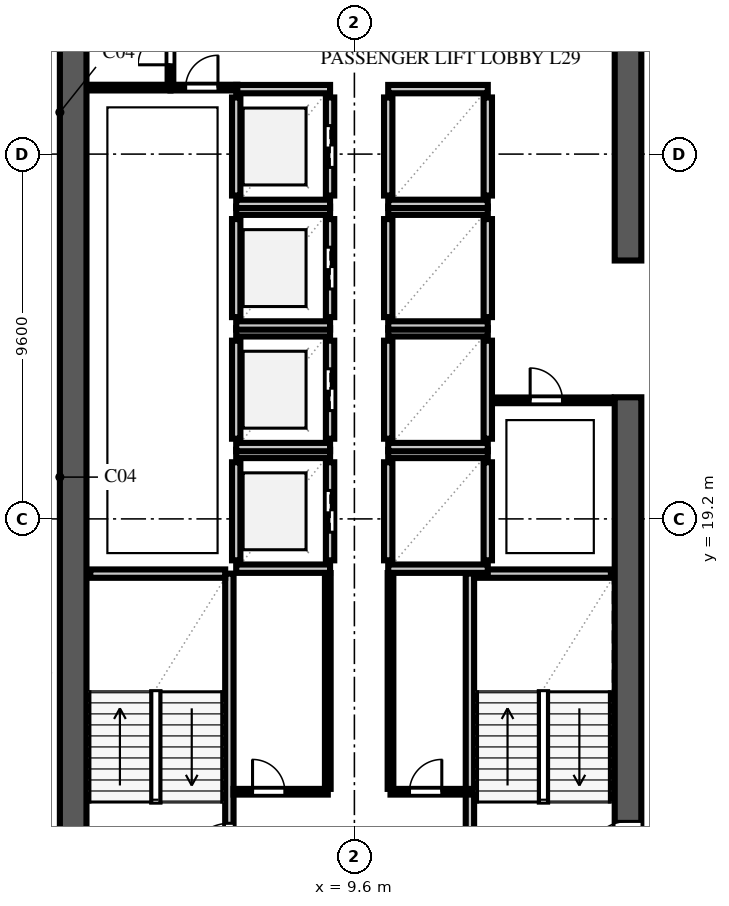
"""IFC4 building model, lengths in metres.
Left out: names, types, materials, properties, quantities, classifications, styles, units other than length and angle.
Written with IfcOpenShell. Run it as: python <this file> out.ifc"""

import sys

from ifc_helpers import new_model, si_unit, direction, frame, frame_2d, origin, place, context, subcontext, project, spatial, rectangle, extrude, element, fill, save


model = new_model("IFC4")
c1 = context("Model", 3, precision=1e-05, world=origin(), true_north=direction((0.0, 1.0)))
c2 = subcontext(c1, "Body", "Model", "MODEL_VIEW")
j1 = project(units=[si_unit("LENGTHUNIT", "METRE"), si_unit("PLANEANGLEUNIT", "RADIAN")], contexts=[c1])
p1 = place(None, origin())
s1 = spatial("IfcSite", under=j1, at=p1, CompositionType="ELEMENT")
p2 = place(p1, origin())
s2 = spatial("IfcBuilding", under=s1, at=p2, CompositionType="ELEMENT")
p3 = place(p2, frame((0.0, 0.0, 116.6)))
s3 = spatial("IfcBuildingStorey", under=s2, at=p3, CompositionType="ELEMENT", Elevation=116.6)
p4 = place(p3, frame((2.2, 9.25, 0.0), z_axis=(0.0, 0.0, 1.0), x_axis=(0.0, 1.0, 0.0)))
e1 = element("IfcWall", 1, at=p4, inside=s3, PredefinedType="SHEAR", context=c2, shape_type="SweptSolid", body=[
    extrude(rectangle(XDim=39.1, YDim=0.7, at=frame_2d((19.55, 0.0))), origin(), (0.0, 0.0, 1.0), 3.54),
])
p5 = place(p3, frame((16.8, 9.95, 0.0), z_axis=(0.0, 0.0, 1.0), x_axis=(0.0, 1.0, 0.0)))
e2 = element("IfcWall", 2, at=p5, inside=s3, PredefinedType="SHEAR", context=c2, shape_type="SweptSolid", body=[
    extrude(rectangle(XDim=12.45, YDim=0.7, at=frame_2d((6.225, 0.0))), origin(), (0.0, 0.0, 1.0), 3.54),
])
p6 = place(p5, frame((0.19, 0.0, 0.0)))
e3 = element("IfcOpeningElement", 3, at=p6, cuts=e2, PredefinedType="OPENING", context=c2, shape_type="SweptSolid", body=[
    extrude(rectangle(XDim=1.1, YDim=2.2, at=frame_2d((0.55, 1.1))), frame((0.0, 0.362, 0.0), z_axis=(0.0, -1.0, 0.0), x_axis=(1.0, 0.0, 0.0)), (0.0, 0.0, 1.0), 0.724),
])
p7 = place(p3, frame((16.8, 26.0, 0.0), z_axis=(0.0, 0.0, 1.0), x_axis=(0.0, 1.0, 0.0)))
e4 = element("IfcWall", 4, at=p7, inside=s3, PredefinedType="SHEAR", context=c2, shape_type="SweptSolid", body=[
    extrude(rectangle(XDim=7.8, YDim=0.7, at=frame_2d((3.9, 0.0))), origin(), (0.0, 0.0, 1.0), 3.54),
])
p8 = place(p3, frame((6.31, 9.95, 0.0), z_axis=(0.0, 0.0, 1.0), x_axis=(0.0, 1.0, 0.0)))
e5 = element("IfcWall", 5, at=p8, inside=s3, PredefinedType="SOLIDWALL", context=c2, shape_type="SweptSolid", body=[
    extrude(rectangle(XDim=7.81, YDim=0.22, at=frame_2d((3.905, 0.0))), origin(), (0.0, 0.0, 1.0), 3.54),
])
p9 = place(p8, frame((0.14, 0.0, 0.0)))
e6 = element("IfcOpeningElement", 6, at=p9, cuts=e5, PredefinedType="OPENING", context=c2, shape_type="SweptSolid", body=[
    extrude(rectangle(XDim=1.1, YDim=2.2, at=frame_2d((0.55, 1.1))), frame((0.0, 0.122, 0.0), z_axis=(0.0, -1.0, 0.0), x_axis=(1.0, 0.0, 0.0)), (0.0, 0.0, 1.0), 0.244),
])
p10 = place(p3, frame((2.65, 17.76, 0.0), z_axis=(0.0, 0.0, 1.0), x_axis=(1.0, 0.0, 0.0)))
e7 = element("IfcWall", 7, at=p10, inside=s3, PredefinedType="SOLIDWALL", context=c2, shape_type="SweptSolid", body=[
    extrude(rectangle(XDim=3.55, YDim=0.22, at=frame_2d((1.775, 0.0))), origin(), (0.0, 0.0, 1.0), 3.54),
])
p11 = place(p3, frame((12.64, 10.05, 0.0), z_axis=(0.0, 0.0, 1.0), x_axis=(0.0, 1.0, 0.0)))
e8 = element("IfcWall", 8, at=p11, inside=s3, PredefinedType="SOLIDWALL", context=c2, shape_type="SweptSolid", body=[
    extrude(rectangle(XDim=7.71, YDim=0.22, at=frame_2d((3.855, 0.0))), origin(), (0.0, 0.0, 1.0), 3.54),
])
p12 = place(p3, frame((12.75, 17.76, 0.0), z_axis=(0.0, 0.0, 1.0), x_axis=(1.0, 0.0, 0.0)))
e9 = element("IfcWall", 9, at=p12, inside=s3, PredefinedType="SOLIDWALL", context=c2, shape_type="SweptSolid", body=[
    extrude(rectangle(XDim=3.6, YDim=0.22, at=frame_2d((1.8, 0.0))), origin(), (0.0, 0.0, 1.0), 3.54),
])
p13 = place(p3, frame((6.49, 18.11, 0.0), z_axis=(0.0, 0.0, 1.0), x_axis=(0.0, 1.0, 0.0)))
e10 = element("IfcWall", 10, at=p13, inside=s3, PredefinedType="SOLIDWALL", context=c2, shape_type="SweptSolid", body=[
    extrude(rectangle(XDim=2.58, YDim=0.22, at=frame_2d((1.29, 0.0))), origin(), (0.0, 0.0, 1.0), 3.54),
])
p14 = place(p3, frame((8.96, 18.11, 0.0), z_axis=(0.0, 0.0, 1.0), x_axis=(0.0, 1.0, 0.0)))
e11 = element("IfcWall", 11, at=p14, inside=s3, PredefinedType="SOLIDWALL", context=c2, shape_type="SweptSolid", body=[
    extrude(rectangle(XDim=2.58, YDim=0.22, at=frame_2d((1.29, 0.0))), origin(), (0.0, 0.0, 1.0), 3.54),
])
p15 = place(p14, frame((0.74, 0.0, 0.0)))
e12 = element("IfcOpeningElement", 12, at=p15, cuts=e11, PredefinedType="OPENING", context=c2, shape_type="SweptSolid", body=[
    extrude(rectangle(XDim=1.1, YDim=2.2, at=frame_2d((0.55, 1.1))), frame((0.0, 0.122, 0.0), z_axis=(0.0, -1.0, 0.0), x_axis=(1.0, 0.0, 0.0)), (0.0, 0.0, 1.0), 0.244),
])
for number, where, z_axis, x_axis in (
    (13, (6.49, 17.89, 0.0), (0.0, 0.0, 1.0), (1.0, 0.0, 0.0)),
    (14, (6.49, 20.91, 0.0), (0.0, 0.0, 1.0), (1.0, 0.0, 0.0)),
):
    element("IfcWall", number, at=place(p3, frame(where, z_axis=z_axis, x_axis=x_axis)), inside=s3, PredefinedType="SOLIDWALL", context=c2, shape_type="SweptSolid", body=[
        extrude(rectangle(XDim=2.47, YDim=0.22, at=frame_2d((1.235, 0.0))), origin(), (0.0, 0.0, 1.0), 3.54),
    ])
p16 = place(p3, frame((6.49, 21.31, 0.0), z_axis=(0.0, 0.0, 1.0), x_axis=(0.0, 1.0, 0.0)))
e15 = element("IfcWall", 15, at=p16, inside=s3, PredefinedType="SOLIDWALL", context=c2, shape_type="SweptSolid", body=[
    extrude(rectangle(XDim=2.58, YDim=0.22, at=frame_2d((1.29, 0.0))), origin(), (0.0, 0.0, 1.0), 3.54),
])
p17 = place(p3, frame((8.96, 21.31, 0.0), z_axis=(0.0, 0.0, 1.0), x_axis=(0.0, 1.0, 0.0)))
e16 = element("IfcWall", 16, at=p17, inside=s3, PredefinedType="SOLIDWALL", context=c2, shape_type="SweptSolid", body=[
    extrude(rectangle(XDim=2.58, YDim=0.22, at=frame_2d((1.29, 0.0))), origin(), (0.0, 0.0, 1.0), 3.54),
])
p18 = place(p17, frame((0.74, 0.0, 0.0)))
e17 = element("IfcOpeningElement", 17, at=p18, cuts=e16, PredefinedType="OPENING", context=c2, shape_type="SweptSolid", body=[
    extrude(rectangle(XDim=1.1, YDim=2.2, at=frame_2d((0.55, 1.1))), frame((0.0, 0.122, 0.0), z_axis=(0.0, -1.0, 0.0), x_axis=(1.0, 0.0, 0.0)), (0.0, 0.0, 1.0), 0.244),
])
for number, where, z_axis, x_axis in (
    (18, (6.49, 21.09, 0.0), (0.0, 0.0, 1.0), (1.0, 0.0, 0.0)),
    (19, (6.49, 24.11, 0.0), (0.0, 0.0, 1.0), (1.0, 0.0, 0.0)),
):
    element("IfcWall", number, at=place(p3, frame(where, z_axis=z_axis, x_axis=x_axis)), inside=s3, PredefinedType="SOLIDWALL", context=c2, shape_type="SweptSolid", body=[
        extrude(rectangle(XDim=2.47, YDim=0.22, at=frame_2d((1.235, 0.0))), origin(), (0.0, 0.0, 1.0), 3.54),
    ])
p19 = place(p3, frame((6.49, 24.51, 0.0), z_axis=(0.0, 0.0, 1.0), x_axis=(0.0, 1.0, 0.0)))
e20 = element("IfcWall", 20, at=p19, inside=s3, PredefinedType="SOLIDWALL", context=c2, shape_type="SweptSolid", body=[
    extrude(rectangle(XDim=2.58, YDim=0.22, at=frame_2d((1.29, 0.0))), origin(), (0.0, 0.0, 1.0), 3.54),
])
p20 = place(p3, frame((8.96, 24.51, 0.0), z_axis=(0.0, 0.0, 1.0), x_axis=(0.0, 1.0, 0.0)))
e21 = element("IfcWall", 21, at=p20, inside=s3, PredefinedType="SOLIDWALL", context=c2, shape_type="SweptSolid", body=[
    extrude(rectangle(XDim=2.58, YDim=0.22, at=frame_2d((1.29, 0.0))), origin(), (0.0, 0.0, 1.0), 3.54),
])
p21 = place(p20, frame((0.74, 0.0, 0.0)))
e22 = element("IfcOpeningElement", 22, at=p21, cuts=e21, PredefinedType="OPENING", context=c2, shape_type="SweptSolid", body=[
    extrude(rectangle(XDim=1.1, YDim=2.2, at=frame_2d((0.55, 1.1))), frame((0.0, 0.122, 0.0), z_axis=(0.0, -1.0, 0.0), x_axis=(1.0, 0.0, 0.0)), (0.0, 0.0, 1.0), 0.244),
])
for number, where, z_axis, x_axis in (
    (23, (6.49, 24.29, 0.0), (0.0, 0.0, 1.0), (1.0, 0.0, 0.0)),
    (24, (6.49, 27.31, 0.0), (0.0, 0.0, 1.0), (1.0, 0.0, 0.0)),
):
    element("IfcWall", number, at=place(p3, frame(where, z_axis=z_axis, x_axis=x_axis)), inside=s3, PredefinedType="SOLIDWALL", context=c2, shape_type="SweptSolid", body=[
        extrude(rectangle(XDim=2.47, YDim=0.22, at=frame_2d((1.235, 0.0))), origin(), (0.0, 0.0, 1.0), 3.54),
    ])
p22 = place(p3, frame((6.49, 27.71, 0.0), z_axis=(0.0, 0.0, 1.0), x_axis=(0.0, 1.0, 0.0)))
e25 = element("IfcWall", 25, at=p22, inside=s3, PredefinedType="SOLIDWALL", context=c2, shape_type="SweptSolid", body=[
    extrude(rectangle(XDim=2.58, YDim=0.22, at=frame_2d((1.29, 0.0))), origin(), (0.0, 0.0, 1.0), 3.54),
])
p23 = place(p3, frame((8.96, 27.71, 0.0), z_axis=(0.0, 0.0, 1.0), x_axis=(0.0, 1.0, 0.0)))
e26 = element("IfcWall", 26, at=p23, inside=s3, PredefinedType="SOLIDWALL", context=c2, shape_type="SweptSolid", body=[
    extrude(rectangle(XDim=2.58, YDim=0.22, at=frame_2d((1.29, 0.0))), origin(), (0.0, 0.0, 1.0), 3.54),
])
p24 = place(p23, frame((0.74, 0.0, 0.0)))
e27 = element("IfcOpeningElement", 27, at=p24, cuts=e26, PredefinedType="OPENING", context=c2, shape_type="SweptSolid", body=[
    extrude(rectangle(XDim=1.1, YDim=2.2, at=frame_2d((0.55, 1.1))), frame((0.0, 0.122, 0.0), z_axis=(0.0, -1.0, 0.0), x_axis=(1.0, 0.0, 0.0)), (0.0, 0.0, 1.0), 0.244),
])
for number, where, z_axis, x_axis in (
    (28, (6.49, 27.49, 0.0), (0.0, 0.0, 1.0), (1.0, 0.0, 0.0)),
    (29, (6.49, 30.51, 0.0), (0.0, 0.0, 1.0), (1.0, 0.0, 0.0)),
):
    element("IfcWall", number, at=place(p3, frame(where, z_axis=z_axis, x_axis=x_axis)), inside=s3, PredefinedType="SOLIDWALL", context=c2, shape_type="SweptSolid", body=[
        extrude(rectangle(XDim=2.47, YDim=0.22, at=frame_2d((1.235, 0.0))), origin(), (0.0, 0.0, 1.0), 3.54),
    ])
for number, where, z_axis, x_axis in (
    (30, (10.49, 18.11, 0.0), (0.0, 0.0, 1.0), (0.0, 1.0, 0.0)),
    (31, (13.11, 18.11, 0.0), (0.0, 0.0, 1.0), (0.0, 1.0, 0.0)),
):
    element("IfcWall", number, at=place(p3, frame(where, z_axis=z_axis, x_axis=x_axis)), inside=s3, PredefinedType="SOLIDWALL", context=c2, shape_type="SweptSolid", body=[
        extrude(rectangle(XDim=2.58, YDim=0.22, at=frame_2d((1.29, 0.0))), origin(), (0.0, 0.0, 1.0), 3.54),
    ])
for number, where, z_axis, x_axis in (
    (32, (10.49, 17.89, 0.0), (0.0, 0.0, 1.0), (1.0, 0.0, 0.0)),
    (33, (10.49, 20.91, 0.0), (0.0, 0.0, 1.0), (1.0, 0.0, 0.0)),
):
    element("IfcWall", number, at=place(p3, frame(where, z_axis=z_axis, x_axis=x_axis)), inside=s3, PredefinedType="SOLIDWALL", context=c2, shape_type="SweptSolid", body=[
        extrude(rectangle(XDim=2.62, YDim=0.22, at=frame_2d((1.31, 0.0))), origin(), (0.0, 0.0, 1.0), 3.54),
    ])
for number, where, z_axis, x_axis in (
    (34, (10.49, 21.31, 0.0), (0.0, 0.0, 1.0), (0.0, 1.0, 0.0)),
    (35, (13.11, 21.31, 0.0), (0.0, 0.0, 1.0), (0.0, 1.0, 0.0)),
):
    element("IfcWall", number, at=place(p3, frame(where, z_axis=z_axis, x_axis=x_axis)), inside=s3, PredefinedType="SOLIDWALL", context=c2, shape_type="SweptSolid", body=[
        extrude(rectangle(XDim=2.58, YDim=0.22, at=frame_2d((1.29, 0.0))), origin(), (0.0, 0.0, 1.0), 3.54),
    ])
for number, where, z_axis, x_axis in (
    (36, (10.49, 21.09, 0.0), (0.0, 0.0, 1.0), (1.0, 0.0, 0.0)),
    (37, (10.49, 24.11, 0.0), (0.0, 0.0, 1.0), (1.0, 0.0, 0.0)),
):
    element("IfcWall", number, at=place(p3, frame(where, z_axis=z_axis, x_axis=x_axis)), inside=s3, PredefinedType="SOLIDWALL", context=c2, shape_type="SweptSolid", body=[
        extrude(rectangle(XDim=2.62, YDim=0.22, at=frame_2d((1.31, 0.0))), origin(), (0.0, 0.0, 1.0), 3.54),
    ])
for number, where, z_axis, x_axis in (
    (38, (10.49, 24.51, 0.0), (0.0, 0.0, 1.0), (0.0, 1.0, 0.0)),
    (39, (13.11, 24.51, 0.0), (0.0, 0.0, 1.0), (0.0, 1.0, 0.0)),
):
    element("IfcWall", number, at=place(p3, frame(where, z_axis=z_axis, x_axis=x_axis)), inside=s3, PredefinedType="SOLIDWALL", context=c2, shape_type="SweptSolid", body=[
        extrude(rectangle(XDim=2.58, YDim=0.22, at=frame_2d((1.29, 0.0))), origin(), (0.0, 0.0, 1.0), 3.54),
    ])
for number, where, z_axis, x_axis in (
    (40, (10.49, 24.29, 0.0), (0.0, 0.0, 1.0), (1.0, 0.0, 0.0)),
    (41, (10.49, 27.31, 0.0), (0.0, 0.0, 1.0), (1.0, 0.0, 0.0)),
):
    element("IfcWall", number, at=place(p3, frame(where, z_axis=z_axis, x_axis=x_axis)), inside=s3, PredefinedType="SOLIDWALL", context=c2, shape_type="SweptSolid", body=[
        extrude(rectangle(XDim=2.62, YDim=0.22, at=frame_2d((1.31, 0.0))), origin(), (0.0, 0.0, 1.0), 3.54),
    ])
for number, where, z_axis, x_axis in (
    (42, (10.49, 27.71, 0.0), (0.0, 0.0, 1.0), (0.0, 1.0, 0.0)),
    (43, (13.11, 27.71, 0.0), (0.0, 0.0, 1.0), (0.0, 1.0, 0.0)),
):
    element("IfcWall", number, at=place(p3, frame(where, z_axis=z_axis, x_axis=x_axis)), inside=s3, PredefinedType="SOLIDWALL", context=c2, shape_type="SweptSolid", body=[
        extrude(rectangle(XDim=2.58, YDim=0.22, at=frame_2d((1.29, 0.0))), origin(), (0.0, 0.0, 1.0), 3.54),
    ])
for number, where, z_axis, x_axis in (
    (44, (10.49, 27.49, 0.0), (0.0, 0.0, 1.0), (1.0, 0.0, 0.0)),
    (45, (10.49, 30.51, 0.0), (0.0, 0.0, 1.0), (1.0, 0.0, 0.0)),
):
    element("IfcWall", number, at=place(p3, frame(where, z_axis=z_axis, x_axis=x_axis)), inside=s3, PredefinedType="SOLIDWALL", context=c2, shape_type="SweptSolid", body=[
        extrude(rectangle(XDim=2.62, YDim=0.22, at=frame_2d((1.31, 0.0))), origin(), (0.0, 0.0, 1.0), 3.54),
    ])
p25 = place(p3, frame((6.42, 12.02, 0.0), z_axis=(0.0, 0.0, 1.0), x_axis=(1.0, 0.0, 0.0)))
e46 = element("IfcWall", 46, at=p25, inside=s3, PredefinedType="PARTITIONING", context=c2, shape_type="SweptSolid", body=[
    extrude(rectangle(XDim=2.48, YDim=0.15, at=frame_2d((1.24, 0.0))), origin(), (0.0, 0.0, 1.0), 3.54),
])
p26 = place(p25, frame((0.5, 0.0, 0.0)))
e47 = element("IfcOpeningElement", 47, at=p26, cuts=e46, PredefinedType="OPENING", context=c2, shape_type="SweptSolid", body=[
    extrude(rectangle(XDim=0.85, YDim=2.1, at=frame_2d((0.425, 1.05))), frame((0.0, 0.087, 0.0), z_axis=(0.0, -1.0, 0.0), x_axis=(1.0, 0.0, 0.0)), (0.0, 0.0, 1.0), 0.174),
])
p27 = place(p3, frame((10.55, 12.02, 0.0), z_axis=(0.0, 0.0, 1.0), x_axis=(1.0, 0.0, 0.0)))
e48 = element("IfcWall", 48, at=p27, inside=s3, PredefinedType="PARTITIONING", context=c2, shape_type="SweptSolid", body=[
    extrude(rectangle(XDim=2.08, YDim=0.15, at=frame_2d((1.04, 0.0))), origin(), (0.0, 0.0, 1.0), 3.54),
])
p28 = place(p27, frame((0.5, 0.0, 0.0)))
e49 = element("IfcOpeningElement", 49, at=p28, cuts=e48, PredefinedType="OPENING", context=c2, shape_type="SweptSolid", body=[
    extrude(rectangle(XDim=0.85, YDim=2.1, at=frame_2d((0.425, 1.05))), frame((0.0, 0.087, 0.0), z_axis=(0.0, -1.0, 0.0), x_axis=(1.0, 0.0, 0.0)), (0.0, 0.0, 1.0), 0.174),
])
for number, where, z_axis, x_axis in (
    (50, (8.9, 12.095, 0.0), (0.0, 0.0, 1.0), (0.0, 1.0, 0.0)),
    (51, (10.55, 12.095, 0.0), (0.0, 0.0, 1.0), (0.0, 1.0, 0.0)),
):
    element("IfcWall", number, at=place(p3, frame(where, z_axis=z_axis, x_axis=x_axis)), inside=s3, PredefinedType="PARTITIONING", context=c2, shape_type="SweptSolid", body=[
        extrude(rectangle(XDim=5.68, YDim=0.15, at=frame_2d((2.84, 0.0))), origin(), (0.0, 0.0, 1.0), 3.54),
    ])
p29 = place(p3, frame((13.225, 22.32, 0.0), z_axis=(0.0, 0.0, 1.0), x_axis=(1.0, 0.0, 0.0)))
e52 = element("IfcWall", 52, at=p29, inside=s3, PredefinedType="PARTITIONING", context=c2, shape_type="SweptSolid", body=[
    extrude(rectangle(XDim=3.12, YDim=0.15, at=frame_2d((1.56, 0.0))), origin(), (0.0, 0.0, 1.0), 3.54),
])
p30 = place(p29, frame((1.0, 0.0, 0.0)))
e53 = element("IfcOpeningElement", 53, at=p30, cuts=e52, PredefinedType="OPENING", context=c2, shape_type="SweptSolid", body=[
    extrude(rectangle(XDim=0.85, YDim=2.1, at=frame_2d((0.425, 1.05))), frame((0.0, 0.087, 0.0), z_axis=(0.0, -1.0, 0.0), x_axis=(1.0, 0.0, 0.0)), (0.0, 0.0, 1.0), 0.174),
])
p31 = place(p3, frame((4.76, 30.55, 0.0), z_axis=(0.0, 0.0, 1.0), x_axis=(0.0, 1.0, 0.0)))
e54 = element("IfcWall", 54, at=p31, inside=s3, PredefinedType="PARTITIONING", context=c2, shape_type="SweptSolid", body=[
    extrude(rectangle(XDim=2.93, YDim=0.15, at=frame_2d((1.465, 0.0))), origin(), (0.0, 0.0, 1.0), 3.54),
])
p32 = place(p31, frame((0.6, 0.0, 0.0)))
e55 = element("IfcOpeningElement", 55, at=p32, cuts=e54, PredefinedType="OPENING", context=c2, shape_type="SweptSolid", body=[
    extrude(rectangle(XDim=0.85, YDim=2.1, at=frame_2d((0.425, 1.05))), frame((0.0, 0.087, 0.0), z_axis=(0.0, -1.0, 0.0), x_axis=(1.0, 0.0, 0.0)), (0.0, 0.0, 1.0), 0.174),
])
p33 = place(p3, frame((4.76, 30.55, 0.0), z_axis=(0.0, 0.0, 1.0), x_axis=(1.0, 0.0, 0.0)))
e56 = element("IfcWall", 56, at=p33, inside=s3, PredefinedType="PARTITIONING", context=c2, shape_type="SweptSolid", body=[
    extrude(rectangle(XDim=1.76, YDim=0.15, at=frame_2d((0.88, 0.0))), origin(), (0.0, 0.0, 1.0), 3.54),
])
p34 = place(p33, frame((0.4, 0.0, 0.0)))
e57 = element("IfcOpeningElement", 57, at=p34, cuts=e56, PredefinedType="OPENING", context=c2, shape_type="SweptSolid", body=[
    extrude(rectangle(XDim=0.85, YDim=2.1, at=frame_2d((0.425, 1.05))), frame((0.0, 0.087, 0.0), z_axis=(0.0, -1.0, 0.0), x_axis=(1.0, 0.0, 0.0)), (0.0, 0.0, 1.0), 0.174),
])
p35 = place(p3, frame((2.65, 30.55, 0.0), z_axis=(0.0, 0.0, 1.0), x_axis=(1.0, 0.0, 0.0)))
e58 = element("IfcWall", 58, at=p35, inside=s3, PredefinedType="PARTITIONING", context=c2, shape_type="SweptSolid", body=[
    extrude(rectangle(XDim=2.11, YDim=0.15, at=frame_2d((1.055, 0.0))), origin(), (0.0, 0.0, 1.0), 3.54),
])
p36 = place(p9, origin())
e59 = element("IfcDoor", 59, at=p36, inside=s3, OperationType="SINGLE_SWING_LEFT", PredefinedType="DOOR", context=c2, shape_type="SweptSolid", body=[
    extrude(rectangle(XDim=1.1, YDim=2.2, at=frame_2d((0.55, 1.1))), frame((0.0, 0.025, 0.0), z_axis=(0.0, -1.0, 0.0), x_axis=(1.0, 0.0, 0.0)), (0.0, 0.0, 1.0), 0.05),
])
fill(e6, e59)
p37 = place(p6, origin())
e60 = element("IfcDoor", 60, at=p37, inside=s3, OperationType="SINGLE_SWING_LEFT", PredefinedType="DOOR", context=c2, shape_type="SweptSolid", body=[
    extrude(rectangle(XDim=1.1, YDim=2.2, at=frame_2d((0.55, 1.1))), frame((0.0, 0.025, 0.0), z_axis=(0.0, -1.0, 0.0), x_axis=(1.0, 0.0, 0.0)), (0.0, 0.0, 1.0), 0.05),
])
fill(e3, e60)
p38 = place(p15, origin())
e61 = element("IfcDoor", 61, at=p38, inside=s3, OperationType="DOUBLE_DOOR_SLIDING", PredefinedType="DOOR", context=c2, shape_type="SweptSolid", body=[
    extrude(rectangle(XDim=1.1, YDim=2.2, at=frame_2d((0.55, 1.1))), frame((0.0, 0.025, 0.0), z_axis=(0.0, -1.0, 0.0), x_axis=(1.0, 0.0, 0.0)), (0.0, 0.0, 1.0), 0.05),
])
fill(e12, e61)
p39 = place(p18, origin())
e62 = element("IfcDoor", 62, at=p39, inside=s3, OperationType="DOUBLE_DOOR_SLIDING", PredefinedType="DOOR", context=c2, shape_type="SweptSolid", body=[
    extrude(rectangle(XDim=1.1, YDim=2.2, at=frame_2d((0.55, 1.1))), frame((0.0, 0.025, 0.0), z_axis=(0.0, -1.0, 0.0), x_axis=(1.0, 0.0, 0.0)), (0.0, 0.0, 1.0), 0.05),
])
fill(e17, e62)
p40 = place(p21, origin())
e63 = element("IfcDoor", 63, at=p40, inside=s3, OperationType="DOUBLE_DOOR_SLIDING", PredefinedType="DOOR", context=c2, shape_type="SweptSolid", body=[
    extrude(rectangle(XDim=1.1, YDim=2.2, at=frame_2d((0.55, 1.1))), frame((0.0, 0.025, 0.0), z_axis=(0.0, -1.0, 0.0), x_axis=(1.0, 0.0, 0.0)), (0.0, 0.0, 1.0), 0.05),
])
fill(e22, e63)
p41 = place(p24, origin())
e64 = element("IfcDoor", 64, at=p41, inside=s3, OperationType="DOUBLE_DOOR_SLIDING", PredefinedType="DOOR", context=c2, shape_type="SweptSolid", body=[
    extrude(rectangle(XDim=1.1, YDim=2.2, at=frame_2d((0.55, 1.1))), frame((0.0, 0.025, 0.0), z_axis=(0.0, -1.0, 0.0), x_axis=(1.0, 0.0, 0.0)), (0.0, 0.0, 1.0), 0.05),
])
fill(e27, e64)
p42 = place(p26, origin())
e65 = element("IfcDoor", 65, at=p42, inside=s3, OperationType="SINGLE_SWING_LEFT", PredefinedType="DOOR", context=c2, shape_type="SweptSolid", body=[
    extrude(rectangle(XDim=0.85, YDim=2.1, at=frame_2d((0.425, 1.05))), frame((0.0, 0.025, 0.0), z_axis=(0.0, -1.0, 0.0), x_axis=(1.0, 0.0, 0.0)), (0.0, 0.0, 1.0), 0.05),
])
fill(e47, e65)
p43 = place(p28, origin())
e66 = element("IfcDoor", 66, at=p43, inside=s3, OperationType="SINGLE_SWING_RIGHT", PredefinedType="DOOR", context=c2, shape_type="SweptSolid", body=[
    extrude(rectangle(XDim=0.85, YDim=2.1, at=frame_2d((0.425, 1.05))), frame((0.0, 0.025, 0.0), z_axis=(0.0, -1.0, 0.0), x_axis=(1.0, 0.0, 0.0)), (0.0, 0.0, 1.0), 0.05),
])
fill(e49, e66)
p44 = place(p30, origin())
e67 = element("IfcDoor", 67, at=p44, inside=s3, OperationType="SINGLE_SWING_LEFT", PredefinedType="DOOR", context=c2, shape_type="SweptSolid", body=[
    extrude(rectangle(XDim=0.85, YDim=2.1, at=frame_2d((0.425, 1.05))), frame((0.0, 0.025, 0.0), z_axis=(0.0, -1.0, 0.0), x_axis=(1.0, 0.0, 0.0)), (0.0, 0.0, 1.0), 0.05),
])
fill(e53, e67)
p45 = place(p32, origin())
e68 = element("IfcDoor", 68, at=p45, inside=s3, OperationType="SINGLE_SWING_LEFT", PredefinedType="DOOR", context=c2, shape_type="SweptSolid", body=[
    extrude(rectangle(XDim=0.85, YDim=2.1, at=frame_2d((0.425, 1.05))), frame((0.0, 0.025, 0.0), z_axis=(0.0, -1.0, 0.0), x_axis=(1.0, 0.0, 0.0)), (0.0, 0.0, 1.0), 0.05),
])
fill(e55, e68)
p46 = place(p34, origin())
e69 = element("IfcDoor", 69, at=p46, inside=s3, OperationType="SINGLE_SWING_RIGHT", PredefinedType="DOOR", context=c2, shape_type="SweptSolid", body=[
    extrude(rectangle(XDim=0.85, YDim=2.1, at=frame_2d((0.425, 1.05))), frame((0.0, 0.025, 0.0), z_axis=(0.0, -1.0, 0.0), x_axis=(1.0, 0.0, 0.0)), (0.0, 0.0, 1.0), 0.05),
])
fill(e57, e69)
save(model, sys.argv[1])
